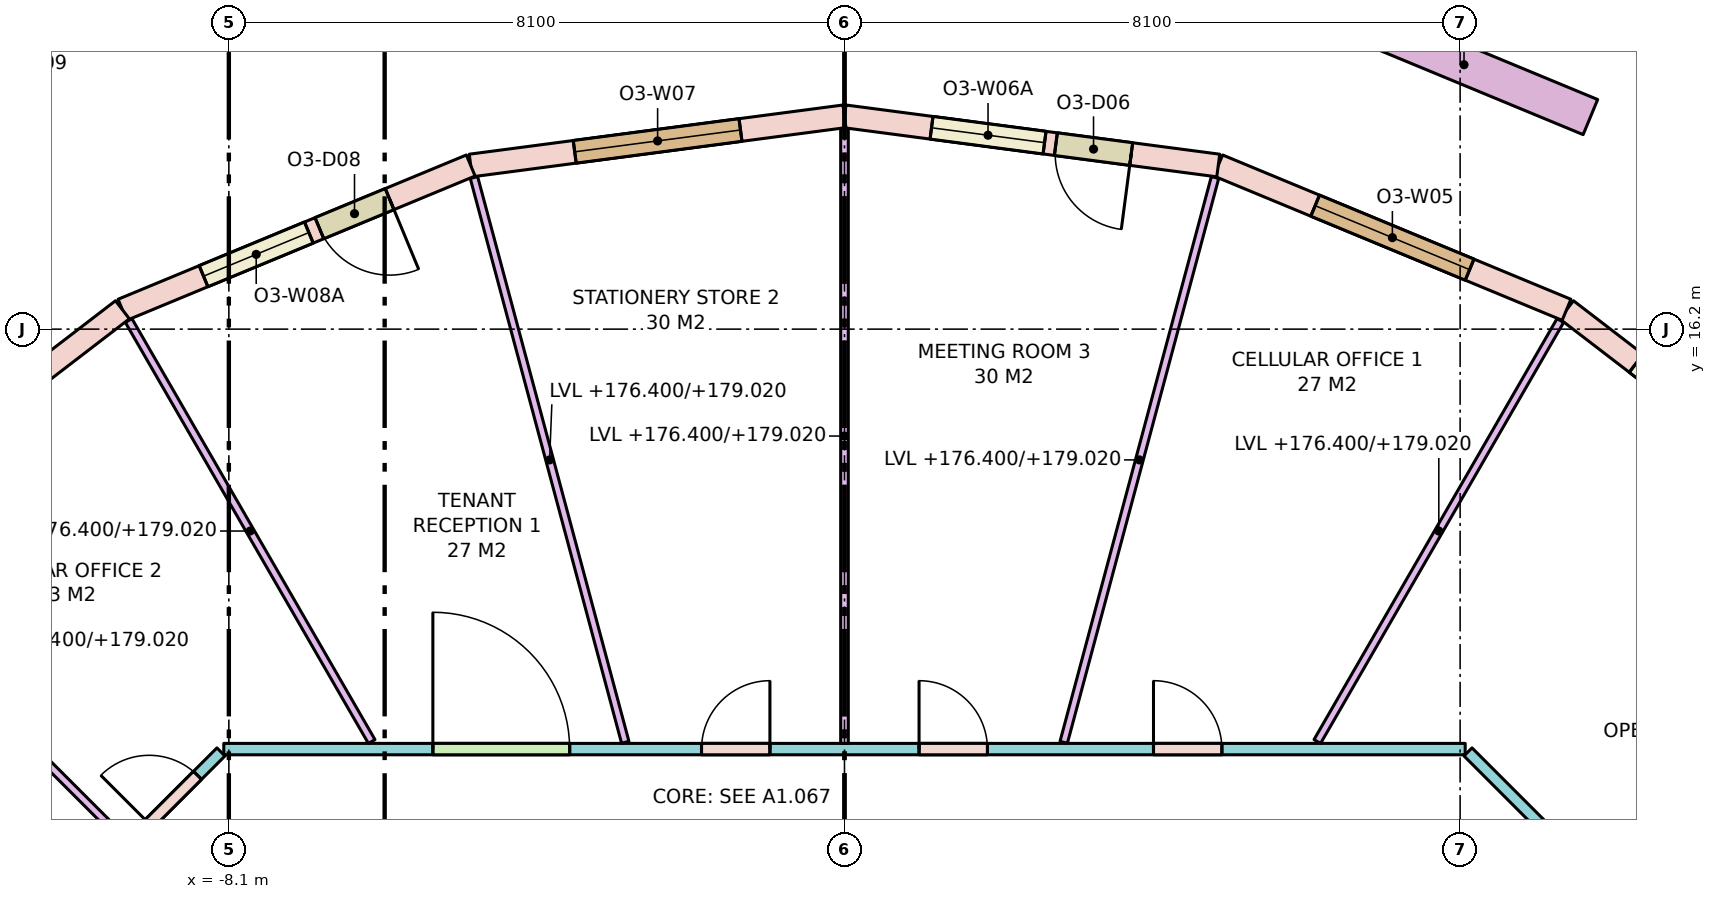
"""IFC4 building model, lengths in metres.
Left out: names, types, materials, properties, quantities, classifications, styles, units other than length and angle.
Written with IfcOpenShell. Run it as: python <this file> out.ifc"""

import sys

from ifc_helpers import new_model, si_unit, direction, frame, frame_2d, origin, place, context, subcontext, project, spatial, rectangle, extrude, element, fill, save


model = new_model("IFC4")
c1 = context("Model", 3, precision=1e-05, world=origin(), true_north=direction((0.0, 1.0)))
c2 = subcontext(c1, "Body", "Model", "MODEL_VIEW")
j1 = project(units=[si_unit("LENGTHUNIT", "METRE"), si_unit("PLANEANGLEUNIT", "RADIAN")], contexts=[c1])
p1 = place(None, origin())
s1 = spatial("IfcSite", under=j1, at=p1, CompositionType="ELEMENT")
p2 = place(p1, origin())
s2 = spatial("IfcBuilding", under=s1, at=p2, CompositionType="ELEMENT")
p3 = place(p2, frame((0.0, 0.0, 176.4)))
s3 = spatial("IfcBuildingStorey", under=s2, at=p3, CompositionType="ELEMENT", Elevation=176.4)
p4 = place(p3, frame((13.435, 13.435, 0.0), z_axis=(0.0, 0.0, 1.0), x_axis=(-0.793348024649, 0.608768356425, 0.0)))
e1 = element("IfcWall", 1, at=p4, inside=s3, PredefinedType="STANDARD", context=c2, shape_type="SweptSolid", body=[
    extrude(rectangle(XDim=4.96, YDim=0.3, at=frame_2d((2.48, 0.0))), origin(), (0.0, 0.0, 1.0), 3.42),
])
p5 = place(p4, frame((1.155, 0.0, 0.0)))
e2 = element("IfcOpeningElement", 2, at=p5, cuts=e1, PredefinedType="OPENING", context=c2, shape_type="SweptSolid", body=[
    extrude(rectangle(XDim=1.0, YDim=2.4, at=frame_2d((0.5, 1.2))), frame((0.0, 0.16, 0.0), z_axis=(0.0, -1.0, 0.0), x_axis=(1.0, 0.0, 0.0)), (0.0, 0.0, 1.0), 0.32),
])
p6 = place(p4, frame((2.305, 0.0, 0.8)))
e3 = element("IfcOpeningElement", 3, at=p6, cuts=e1, PredefinedType="OPENING", context=c2, shape_type="SweptSolid", body=[
    extrude(rectangle(XDim=1.5, YDim=2.4, at=frame_2d((0.75, 1.2))), frame((0.0, 0.16, 0.0), z_axis=(0.0, -1.0, 0.0), x_axis=(1.0, 0.0, 0.0)), (0.0, 0.0, 1.0), 0.32),
])
p7 = place(p3, frame((9.5, 16.455, 0.0), z_axis=(0.0, 0.0, 1.0), x_axis=(-0.923893254961, 0.382650301762, 0.0)))
e4 = element("IfcWall", 4, at=p7, inside=s3, PredefinedType="STANDARD", context=c2, shape_type="SweptSolid", body=[
    extrude(rectangle(XDim=4.96, YDim=0.3, at=frame_2d((2.48, 0.0))), origin(), (0.0, 0.0, 1.0), 3.42),
])
p8 = place(p7, frame((1.38, 0.0, 0.8)))
e5 = element("IfcOpeningElement", 5, at=p8, cuts=e4, PredefinedType="OPENING", context=c2, shape_type="SweptSolid", body=[
    extrude(rectangle(XDim=2.2, YDim=2.4, at=frame_2d((1.1, 1.2))), frame((0.0, 0.16, 0.0), z_axis=(0.0, -1.0, 0.0), x_axis=(1.0, 0.0, 0.0)), (0.0, 0.0, 1.0), 0.32),
])
p9 = place(p3, frame((4.917, 18.353, 0.0), z_axis=(0.0, 0.0, 1.0), x_axis=(-0.991443234469, 0.130538549191, 0.0)))
e6 = element("IfcWall", 6, at=p9, inside=s3, PredefinedType="STANDARD", context=c2, shape_type="SweptSolid", body=[
    extrude(rectangle(XDim=4.96, YDim=0.3, at=frame_2d((2.48, 0.0))), origin(), (0.0, 0.0, 1.0), 3.42),
])
p10 = place(p9, frame((1.155, 0.0, 0.0)))
e7 = element("IfcOpeningElement", 7, at=p10, cuts=e6, PredefinedType="OPENING", context=c2, shape_type="SweptSolid", body=[
    extrude(rectangle(XDim=1.0, YDim=2.4, at=frame_2d((0.5, 1.2))), frame((0.0, 0.16, 0.0), z_axis=(0.0, -1.0, 0.0), x_axis=(1.0, 0.0, 0.0)), (0.0, 0.0, 1.0), 0.32),
])
p11 = place(p9, frame((2.305, 0.0, 0.8)))
e8 = element("IfcOpeningElement", 8, at=p11, cuts=e6, PredefinedType="OPENING", context=c2, shape_type="SweptSolid", body=[
    extrude(rectangle(XDim=1.5, YDim=2.4, at=frame_2d((0.75, 1.2))), frame((0.0, 0.16, 0.0), z_axis=(0.0, -1.0, 0.0), x_axis=(1.0, 0.0, 0.0)), (0.0, 0.0, 1.0), 0.32),
])
p12 = place(p3, frame((0.0, 19.0, 0.0), z_axis=(0.0, 0.0, 1.0), x_axis=(-0.991443234469, -0.130538549191, 0.0)))
e9 = element("IfcWall", 9, at=p12, inside=s3, PredefinedType="STANDARD", context=c2, shape_type="SweptSolid", body=[
    extrude(rectangle(XDim=4.96, YDim=0.3, at=frame_2d((2.48, 0.0))), origin(), (0.0, 0.0, 1.0), 3.42),
])
p13 = place(p12, frame((1.38, 0.0, 0.8)))
e10 = element("IfcOpeningElement", 10, at=p13, cuts=e9, PredefinedType="OPENING", context=c2, shape_type="SweptSolid", body=[
    extrude(rectangle(XDim=2.2, YDim=2.4, at=frame_2d((1.1, 1.2))), frame((0.0, 0.16, 0.0), z_axis=(0.0, -1.0, 0.0), x_axis=(1.0, 0.0, 0.0)), (0.0, 0.0, 1.0), 0.32),
])
p14 = place(p3, frame((-4.917, 18.353, 0.0), z_axis=(0.0, 0.0, 1.0), x_axis=(-0.923893254961, -0.382650301762, 0.0)))
e11 = element("IfcWall", 11, at=p14, inside=s3, PredefinedType="STANDARD", context=c2, shape_type="SweptSolid", body=[
    extrude(rectangle(XDim=4.96, YDim=0.3, at=frame_2d((2.48, 0.0))), origin(), (0.0, 0.0, 1.0), 3.42),
])
p15 = place(p14, frame((1.155, 0.0, 0.0)))
e12 = element("IfcOpeningElement", 12, at=p15, cuts=e11, PredefinedType="OPENING", context=c2, shape_type="SweptSolid", body=[
    extrude(rectangle(XDim=1.0, YDim=2.4, at=frame_2d((0.5, 1.2))), frame((0.0, 0.16, 0.0), z_axis=(0.0, -1.0, 0.0), x_axis=(1.0, 0.0, 0.0)), (0.0, 0.0, 1.0), 0.32),
])
p16 = place(p14, frame((2.305, 0.0, 0.8)))
e13 = element("IfcOpeningElement", 13, at=p16, cuts=e11, PredefinedType="OPENING", context=c2, shape_type="SweptSolid", body=[
    extrude(rectangle(XDim=1.5, YDim=2.4, at=frame_2d((0.75, 1.2))), frame((0.0, 0.16, 0.0), z_axis=(0.0, -1.0, 0.0), x_axis=(1.0, 0.0, 0.0)), (0.0, 0.0, 1.0), 0.32),
])
p17 = place(p3, frame((-9.5, 16.455, 0.0), z_axis=(0.0, 0.0, 1.0), x_axis=(-0.793348024649, -0.608768356425, 0.0)))
e14 = element("IfcWall", 14, at=p17, inside=s3, PredefinedType="STANDARD", context=c2, shape_type="SweptSolid", body=[
    extrude(rectangle(XDim=4.96, YDim=0.3, at=frame_2d((2.48, 0.0))), origin(), (0.0, 0.0, 1.0), 3.42),
])
p18 = place(p17, frame((1.38, 0.0, 0.8)))
e15 = element("IfcOpeningElement", 15, at=p18, cuts=e14, PredefinedType="OPENING", context=c2, shape_type="SweptSolid", body=[
    extrude(rectangle(XDim=2.2, YDim=2.4, at=frame_2d((1.1, 1.2))), frame((0.0, 0.16, 0.0), z_axis=(0.0, -1.0, 0.0), x_axis=(1.0, 0.0, 0.0)), (0.0, 0.0, 1.0), 0.32),
])
p19 = place(p3, frame((9.814, 18.99, 0.0), z_axis=(0.0, 0.0, 1.0), x_axis=(-0.923875488976, 0.382693194178, 0.0)))
e16 = element("IfcWall", 16, at=p19, inside=s3, PredefinedType="PARAPET", context=c2, shape_type="SweptSolid", body=[
    extrude(rectangle(XDim=3.6, YDim=0.5, at=frame_2d((1.8, 0.0))), origin(), (0.0, 0.0, 1.0), 0.9),
])
p20 = place(p3, frame((-12.638, 6.204, 0.0), z_axis=(0.0, 0.0, 1.0), x_axis=(0.707106781187, 0.707106781187, 0.0)))
e17 = element("IfcWall", 17, at=p20, inside=s3, PredefinedType="PARTITIONING", context=c2, shape_type="SweptSolid", body=[
    extrude(rectangle(XDim=6.271, YDim=0.15, at=frame_2d((3.135, 0.0))), origin(), (0.0, 0.0, 1.0), 2.62),
])
p21 = place(p20, frame((4.935, 0.0, 0.0)))
e18 = element("IfcOpeningElement", 18, at=p21, cuts=e17, PredefinedType="OPENING", context=c2, shape_type="SweptSolid", body=[
    extrude(rectangle(XDim=0.9, YDim=2.1, at=frame_2d((0.45, 1.05))), frame((0.0, 0.085, 0.0), z_axis=(0.0, -1.0, 0.0), x_axis=(1.0, 0.0, 0.0)), (0.0, 0.0, 1.0), 0.17),
])
p22 = place(p3, frame((-8.167, 10.675, 0.0), z_axis=(0.0, 0.0, 1.0), x_axis=(1.0, 0.0, 0.0)))
e19 = element("IfcWall", 19, at=p22, inside=s3, PredefinedType="PARTITIONING", context=c2, shape_type="SweptSolid", body=[
    extrude(rectangle(XDim=16.333, YDim=0.15, at=frame_2d((8.167, 0.0))), origin(), (0.0, 0.0, 1.0), 2.62),
])
p23 = place(p22, frame((12.232, 0.0, 0.0)))
e20 = element("IfcOpeningElement", 20, at=p23, cuts=e19, PredefinedType="OPENING", context=c2, shape_type="SweptSolid", body=[
    extrude(rectangle(XDim=0.9, YDim=2.1, at=frame_2d((0.45, 1.05))), frame((0.0, 0.085, 0.0), z_axis=(0.0, -1.0, 0.0), x_axis=(1.0, 0.0, 0.0)), (0.0, 0.0, 1.0), 0.17),
])
p24 = place(p22, frame((9.148, 0.0, 0.0)))
e21 = element("IfcOpeningElement", 21, at=p24, cuts=e19, PredefinedType="OPENING", context=c2, shape_type="SweptSolid", body=[
    extrude(rectangle(XDim=0.9, YDim=2.1, at=frame_2d((0.45, 1.05))), frame((0.0, 0.085, 0.0), z_axis=(0.0, -1.0, 0.0), x_axis=(1.0, 0.0, 0.0)), (0.0, 0.0, 1.0), 0.17),
])
p25 = place(p22, frame((6.285, 0.0, 0.0)))
e22 = element("IfcOpeningElement", 22, at=p25, cuts=e19, PredefinedType="OPENING", context=c2, shape_type="SweptSolid", body=[
    extrude(rectangle(XDim=0.9, YDim=2.1, at=frame_2d((0.45, 1.05))), frame((0.0, 0.085, 0.0), z_axis=(0.0, -1.0, 0.0), x_axis=(1.0, 0.0, 0.0)), (0.0, 0.0, 1.0), 0.17),
])
p26 = place(p22, frame((2.751, 0.0, 0.0)))
e23 = element("IfcOpeningElement", 23, at=p26, cuts=e19, PredefinedType="OPENING", context=c2, shape_type="SweptSolid", body=[
    extrude(rectangle(XDim=1.8, YDim=2.1, at=frame_2d((0.9, 1.05))), frame((0.0, 0.085, 0.0), z_axis=(0.0, -1.0, 0.0), x_axis=(1.0, 0.0, 0.0)), (0.0, 0.0, 1.0), 0.17),
])
p27 = place(p3, frame((8.204, 10.638, 0.0), z_axis=(0.0, 0.0, 1.0), x_axis=(0.707106781187, -0.707106781187, 0.0)))
e24 = element("IfcWall", 24, at=p27, inside=s3, PredefinedType="PARTITIONING", context=c2, shape_type="SweptSolid", body=[
    extrude(rectangle(XDim=6.271, YDim=0.15, at=frame_2d((3.135, 0.0))), origin(), (0.0, 0.0, 1.0), 2.62),
])
p28 = place(p3, frame((6.221, 10.775, 0.0), z_axis=(0.0, 0.0, 1.0), x_axis=(0.500023166934, 0.866012027936, 0.0)))
e25 = element("IfcWall", 25, at=p28, inside=s3, PredefinedType="PARTITIONING", context=c2, shape_type="SweptSolid", body=[
    extrude(rectangle(XDim=6.395, YDim=0.1, at=frame_2d((3.198, 0.0))), origin(), (0.0, 0.0, 1.0), 2.62),
])
p29 = place(p3, frame((2.884, 10.764, 0.0), z_axis=(0.0, 0.0, 1.0), x_axis=(0.25881804804, 0.965926093451, 0.0)))
e26 = element("IfcWall", 26, at=p29, inside=s3, PredefinedType="PARTITIONING", context=c2, shape_type="SweptSolid", body=[
    extrude(rectangle(XDim=7.693, YDim=0.1, at=frame_2d((3.846, 0.0))), origin(), (0.0, 0.0, 1.0), 2.62),
])
p30 = place(p3, frame((0.0, 10.75, 0.0), z_axis=(0.0, 0.0, 1.0), x_axis=(0.0, 1.0, 0.0)))
e27 = element("IfcWall", 27, at=p30, inside=s3, PredefinedType="PARTITIONING", context=c2, shape_type="SweptSolid", body=[
    extrude(rectangle(XDim=8.087, YDim=0.1, at=frame_2d((4.043, 0.0))), origin(), (0.0, 0.0, 1.0), 2.62),
])
p31 = place(p3, frame((-2.884, 10.764, 0.0), z_axis=(0.0, 0.0, 1.0), x_axis=(-0.25881804804, 0.965926093451, 0.0)))
e28 = element("IfcWall", 28, at=p31, inside=s3, PredefinedType="PARTITIONING", context=c2, shape_type="SweptSolid", body=[
    extrude(rectangle(XDim=7.693, YDim=0.1, at=frame_2d((3.846, 0.0))), origin(), (0.0, 0.0, 1.0), 2.62),
])
p32 = place(p3, frame((-6.221, 10.775, 0.0), z_axis=(0.0, 0.0, 1.0), x_axis=(-0.500023166934, 0.866012027936, 0.0)))
e29 = element("IfcWall", 29, at=p32, inside=s3, PredefinedType="PARTITIONING", context=c2, shape_type="SweptSolid", body=[
    extrude(rectangle(XDim=6.395, YDim=0.1, at=frame_2d((3.198, 0.0))), origin(), (0.0, 0.0, 1.0), 2.62),
])
p33 = place(p3, frame((-9.474, 9.474, 0.0), z_axis=(0.0, 0.0, 1.0), x_axis=(-0.707106781187, 0.707106781187, 0.0)))
e30 = element("IfcWall", 30, at=p33, inside=s3, PredefinedType="PARTITIONING", context=c2, shape_type="SweptSolid", body=[
    extrude(rectangle(XDim=5.439, YDim=0.1, at=frame_2d((2.719, 0.0))), origin(), (0.0, 0.0, 1.0), 2.62),
])
p34 = place(p6, origin())
e31 = element("IfcWindow", 31, at=p34, inside=s3, PartitioningType="SINGLE_PANEL", PredefinedType="WINDOW", context=c2, shape_type="SweptSolid", body=[
    extrude(rectangle(XDim=1.5, YDim=2.4, at=frame_2d((0.75, 1.2))), frame((0.0, 0.03, 0.0), z_axis=(0.0, -1.0, 0.0), x_axis=(1.0, 0.0, 0.0)), (0.0, 0.0, 1.0), 0.06),
])
fill(e3, e31)
p35 = place(p8, origin())
e32 = element("IfcWindow", 32, at=p35, inside=s3, PartitioningType="SINGLE_PANEL", PredefinedType="WINDOW", context=c2, shape_type="SweptSolid", body=[
    extrude(rectangle(XDim=2.2, YDim=2.4, at=frame_2d((1.1, 1.2))), frame((0.0, 0.03, 0.0), z_axis=(0.0, -1.0, 0.0), x_axis=(1.0, 0.0, 0.0)), (0.0, 0.0, 1.0), 0.06),
])
fill(e5, e32)
p36 = place(p10, origin())
e33 = element("IfcDoor", 33, at=p36, inside=s3, OperationType="SINGLE_SWING_LEFT", PredefinedType="DOOR", context=c2, shape_type="SweptSolid", body=[
    extrude(rectangle(XDim=1.0, YDim=2.4, at=frame_2d((0.5, 1.2))), frame((0.0, 0.025, 0.0), z_axis=(0.0, -1.0, 0.0), x_axis=(1.0, 0.0, 0.0)), (0.0, 0.0, 1.0), 0.05),
])
fill(e7, e33)
p37 = place(p11, origin())
e34 = element("IfcWindow", 34, at=p37, inside=s3, PartitioningType="SINGLE_PANEL", PredefinedType="WINDOW", context=c2, shape_type="SweptSolid", body=[
    extrude(rectangle(XDim=1.5, YDim=2.4, at=frame_2d((0.75, 1.2))), frame((0.0, 0.03, 0.0), z_axis=(0.0, -1.0, 0.0), x_axis=(1.0, 0.0, 0.0)), (0.0, 0.0, 1.0), 0.06),
])
fill(e8, e34)
p38 = place(p13, origin())
e35 = element("IfcWindow", 35, at=p38, inside=s3, PartitioningType="SINGLE_PANEL", PredefinedType="WINDOW", context=c2, shape_type="SweptSolid", body=[
    extrude(rectangle(XDim=2.2, YDim=2.4, at=frame_2d((1.1, 1.2))), frame((0.0, 0.03, 0.0), z_axis=(0.0, -1.0, 0.0), x_axis=(1.0, 0.0, 0.0)), (0.0, 0.0, 1.0), 0.06),
])
fill(e10, e35)
p39 = place(p15, origin())
e36 = element("IfcDoor", 36, at=p39, inside=s3, OperationType="SINGLE_SWING_LEFT", PredefinedType="DOOR", context=c2, shape_type="SweptSolid", body=[
    extrude(rectangle(XDim=1.0, YDim=2.4, at=frame_2d((0.5, 1.2))), frame((0.0, 0.025, 0.0), z_axis=(0.0, -1.0, 0.0), x_axis=(1.0, 0.0, 0.0)), (0.0, 0.0, 1.0), 0.05),
])
fill(e12, e36)
p40 = place(p16, origin())
e37 = element("IfcWindow", 37, at=p40, inside=s3, PartitioningType="SINGLE_PANEL", PredefinedType="WINDOW", context=c2, shape_type="SweptSolid", body=[
    extrude(rectangle(XDim=1.5, YDim=2.4, at=frame_2d((0.75, 1.2))), frame((0.0, 0.03, 0.0), z_axis=(0.0, -1.0, 0.0), x_axis=(1.0, 0.0, 0.0)), (0.0, 0.0, 1.0), 0.06),
])
fill(e13, e37)
p41 = place(p23, origin())
e38 = element("IfcDoor", 38, at=p41, inside=s3, OperationType="SINGLE_SWING_LEFT", PredefinedType="DOOR", context=c2, shape_type="SweptSolid", body=[
    extrude(rectangle(XDim=0.9, YDim=2.1, at=frame_2d((0.45, 1.05))), frame((0.0, 0.025, 0.0), z_axis=(0.0, -1.0, 0.0), x_axis=(1.0, 0.0, 0.0)), (0.0, 0.0, 1.0), 0.05),
])
fill(e20, e38)
p42 = place(p24, origin())
e39 = element("IfcDoor", 39, at=p42, inside=s3, OperationType="SINGLE_SWING_LEFT", PredefinedType="DOOR", context=c2, shape_type="SweptSolid", body=[
    extrude(rectangle(XDim=0.9, YDim=2.1, at=frame_2d((0.45, 1.05))), frame((0.0, 0.025, 0.0), z_axis=(0.0, -1.0, 0.0), x_axis=(1.0, 0.0, 0.0)), (0.0, 0.0, 1.0), 0.05),
])
fill(e21, e39)
p43 = place(p25, origin())
e40 = element("IfcDoor", 40, at=p43, inside=s3, OperationType="SINGLE_SWING_RIGHT", PredefinedType="DOOR", context=c2, shape_type="SweptSolid", body=[
    extrude(rectangle(XDim=0.9, YDim=2.1, at=frame_2d((0.45, 1.05))), frame((0.0, 0.025, 0.0), z_axis=(0.0, -1.0, 0.0), x_axis=(1.0, 0.0, 0.0)), (0.0, 0.0, 1.0), 0.05),
])
fill(e22, e40)
p44 = place(p26, origin())
e41 = element("IfcDoor", 41, at=p44, inside=s3, OperationType="DOUBLE_DOOR_SINGLE_SWING", PredefinedType="DOOR", context=c2, shape_type="SweptSolid", body=[
    extrude(rectangle(XDim=1.8, YDim=2.1, at=frame_2d((0.9, 1.05))), frame((0.0, 0.025, 0.0), z_axis=(0.0, -1.0, 0.0), x_axis=(1.0, 0.0, 0.0)), (0.0, 0.0, 1.0), 0.05),
])
fill(e23, e41)
p45 = place(p21, origin())
e42 = element("IfcDoor", 42, at=p45, inside=s3, OperationType="SINGLE_SWING_LEFT", PredefinedType="DOOR", context=c2, shape_type="SweptSolid", body=[
    extrude(rectangle(XDim=0.9, YDim=2.1, at=frame_2d((0.45, 1.05))), frame((0.0, 0.025, 0.0), z_axis=(0.0, -1.0, 0.0), x_axis=(1.0, 0.0, 0.0)), (0.0, 0.0, 1.0), 0.05),
])
fill(e18, e42)
save(model, sys.argv[1])
